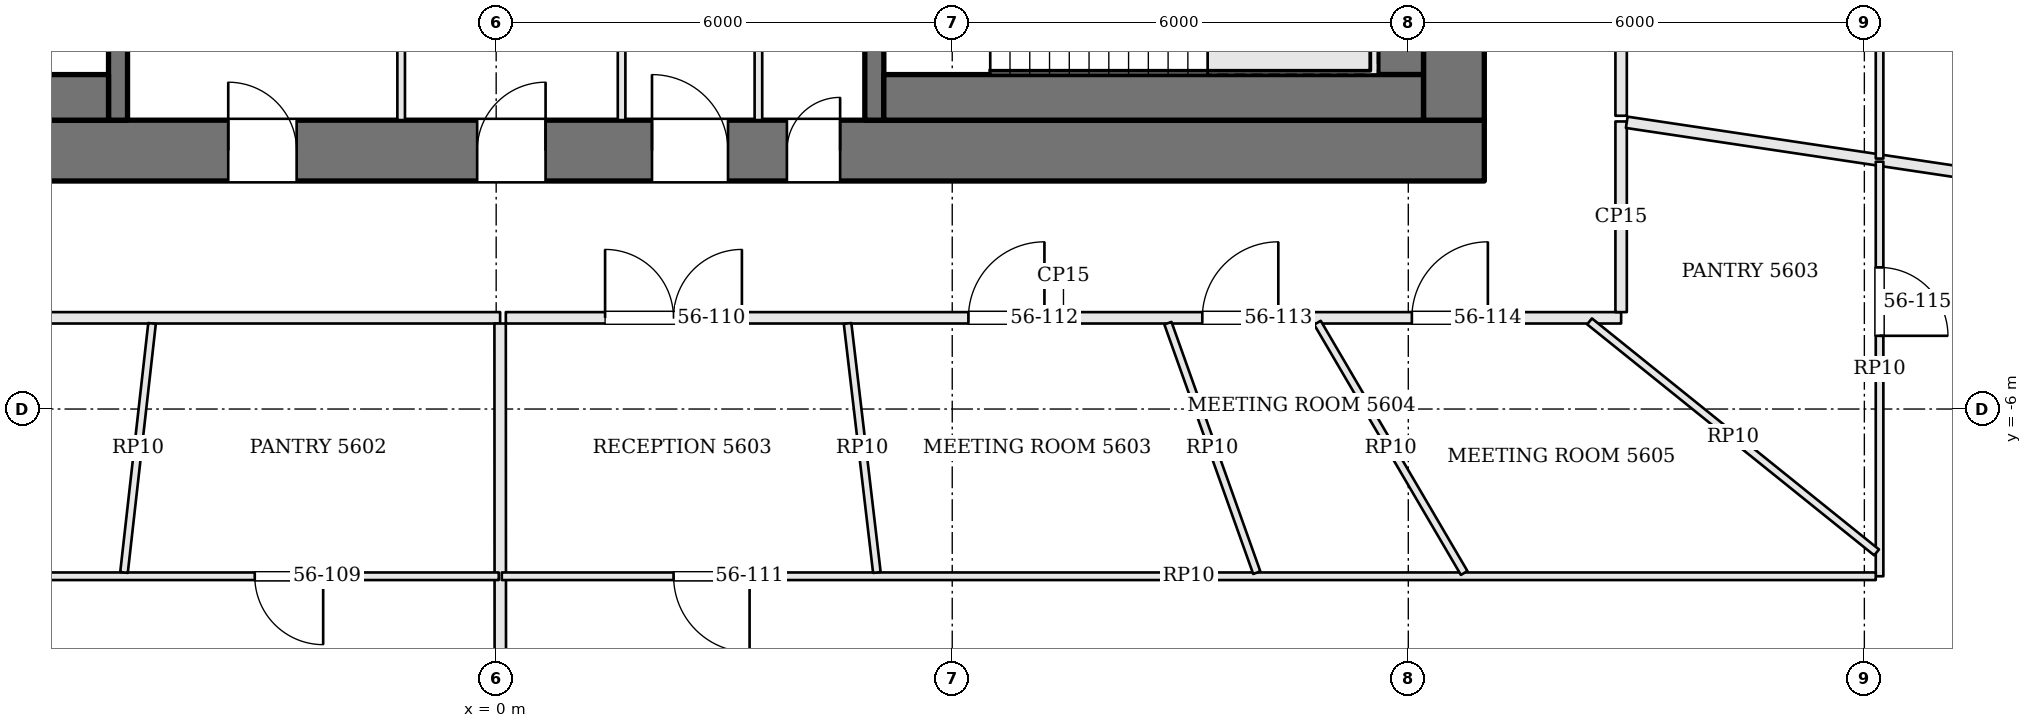
"""IFC4 building model, lengths in metres.
Left out: names, types, materials, properties, quantities, classifications, styles, units other than length and angle.
Written with IfcOpenShell. Run it as: python <this file> out.ifc"""

import sys

from ifc_helpers import new_model, si_unit, direction, frame, frame_2d, origin, place, context, subcontext, project, spatial, rectangle, extrude, element, fill, save


model = new_model("IFC4")
c1 = context("Model", 3, precision=1e-05, world=origin(), true_north=direction((0.0, 1.0)))
c2 = subcontext(c1, "Body", "Model", "MODEL_VIEW")
j1 = project(units=[si_unit("LENGTHUNIT", "METRE"), si_unit("PLANEANGLEUNIT", "RADIAN")], contexts=[c1])
p1 = place(None, origin())
s1 = spatial("IfcSite", under=j1, at=p1, CompositionType="ELEMENT")
p2 = place(p1, origin())
s2 = spatial("IfcBuilding", under=s1, at=p2, CompositionType="ELEMENT")
p3 = place(p2, frame((0.0, 0.0, 229.2)))
s3 = spatial("IfcBuildingStorey", under=s2, at=p3, CompositionType="ELEMENT", Elevation=229.2)
p4 = place(p3, frame((-13.0, -2.6, 0.0), z_axis=(0.0, 0.0, 1.0), x_axis=(1.0, 0.0, 0.0)))
e1 = element("IfcWall", 1, at=p4, inside=s3, PredefinedType="SHEAR", context=c2, shape_type="SweptSolid", body=[
    extrude(rectangle(XDim=26.0, YDim=0.8, at=frame_2d((13.0, 0.0))), origin(), (0.0, 0.0, 1.0), 3.9),
])
p5 = place(p4, frame((9.475, 0.0, 0.0)))
e2 = element("IfcOpeningElement", 2, at=p5, cuts=e1, PredefinedType="OPENING", context=c2, shape_type="SweptSolid", body=[
    extrude(rectangle(XDim=0.9, YDim=2.1, at=frame_2d((0.45, 1.05))), frame((0.0, 0.41, 0.0), z_axis=(0.0, -1.0, 0.0), x_axis=(1.0, 0.0, 0.0)), (0.0, 0.0, 1.0), 0.82),
])
p6 = place(p4, frame((12.75, 0.0, 0.0)))
e3 = element("IfcOpeningElement", 3, at=p6, cuts=e1, PredefinedType="OPENING", context=c2, shape_type="SweptSolid", body=[
    extrude(rectangle(XDim=0.9, YDim=2.1, at=frame_2d((0.45, 1.05))), frame((0.0, 0.41, 0.0), z_axis=(0.0, -1.0, 0.0), x_axis=(1.0, 0.0, 0.0)), (0.0, 0.0, 1.0), 0.82),
])
p7 = place(p4, frame((15.05, 0.0, 0.0)))
e4 = element("IfcOpeningElement", 4, at=p7, cuts=e1, PredefinedType="OPENING", context=c2, shape_type="SweptSolid", body=[
    extrude(rectangle(XDim=1.0, YDim=2.1, at=frame_2d((0.5, 1.05))), frame((0.0, 0.41, 0.0), z_axis=(0.0, -1.0, 0.0), x_axis=(1.0, 0.0, 0.0)), (0.0, 0.0, 1.0), 0.82),
])
p8 = place(p4, frame((16.825, 0.0, 0.0)))
e5 = element("IfcOpeningElement", 5, at=p8, cuts=e1, PredefinedType="OPENING", context=c2, shape_type="SweptSolid", body=[
    extrude(rectangle(XDim=0.7, YDim=2.1, at=frame_2d((0.35, 1.05))), frame((0.0, 0.41, 0.0), z_axis=(0.0, -1.0, 0.0), x_axis=(1.0, 0.0, 0.0)), (0.0, 0.0, 1.0), 0.82),
])
p9 = place(p3, frame((12.6, -2.2, 0.0), z_axis=(0.0, 0.0, 1.0), x_axis=(0.0, 1.0, 0.0)))
e6 = element("IfcWall", 6, at=p9, inside=s3, PredefinedType="SHEAR", context=c2, shape_type="SweptSolid", body=[
    extrude(rectangle(XDim=13.4, YDim=0.8, at=frame_2d((6.7, 0.0))), origin(), (0.0, 0.0, 1.0), 3.9),
])
p10 = place(p9, frame((7.4, 0.0, 0.0)))
e7 = element("IfcOpeningElement", 7, at=p10, cuts=e6, PredefinedType="OPENING", context=c2, shape_type="SweptSolid", body=[
    extrude(rectangle(XDim=1.8, YDim=2.1, at=frame_2d((0.9, 1.05))), frame((0.0, 0.41, 0.0), z_axis=(0.0, -1.0, 0.0), x_axis=(1.0, 0.0, 0.0)), (0.0, 0.0, 1.0), 0.82),
])
p11 = place(p3, frame((-4.975, -2.2, 0.0), z_axis=(0.0, 0.0, 1.0), x_axis=(0.0, 1.0, 0.0)))
e8 = element("IfcWall", 8, at=p11, inside=s3, PredefinedType="SOLIDWALL", context=c2, shape_type="SweptSolid", body=[
    extrude(rectangle(XDim=13.4, YDim=0.25, at=frame_2d((6.7, 0.0))), origin(), (0.0, 0.0, 1.0), 3.7),
])
p12 = place(p11, frame((5.25, 0.0, 0.0)))
e9 = element("IfcOpeningElement", 9, at=p12, cuts=e8, PredefinedType="OPENING", context=c2, shape_type="SweptSolid", body=[
    extrude(rectangle(XDim=1.2, YDim=2.1, at=frame_2d((0.6, 1.05))), frame((0.0, 0.135, 0.0), z_axis=(0.0, -1.0, 0.0), x_axis=(1.0, 0.0, 0.0)), (0.0, 0.0, 1.0), 0.27),
])
p13 = place(p3, frame((4.975, 11.2, 0.0), z_axis=(0.0, 0.0, 1.0), x_axis=(0.0, -1.0, 0.0)))
e10 = element("IfcWall", 10, at=p13, inside=s3, PredefinedType="SOLIDWALL", context=c2, shape_type="SweptSolid", body=[
    extrude(rectangle(XDim=13.4, YDim=0.25, at=frame_2d((6.7, 0.0))), origin(), (0.0, 0.0, 1.0), 3.7),
])
p14 = place(p13, frame((5.25, 0.0, 0.0)))
e11 = element("IfcOpeningElement", 11, at=p14, cuts=e10, PredefinedType="OPENING", context=c2, shape_type="SweptSolid", body=[
    extrude(rectangle(XDim=1.2, YDim=2.1, at=frame_2d((0.6, 1.05))), frame((0.0, 0.135, 0.0), z_axis=(0.0, -1.0, 0.0), x_axis=(1.0, 0.0, 0.0)), (0.0, 0.0, 1.0), 0.27),
])
p15 = place(p3, frame((-12.2, -1.9, 0.0), z_axis=(0.0, 0.0, 1.0), x_axis=(1.0, 0.0, 0.0)))
e12 = element("IfcWall", 12, at=p15, inside=s3, PredefinedType="SOLIDWALL", context=c2, shape_type="SweptSolid", body=[
    extrude(rectangle(XDim=7.1, YDim=0.6, at=frame_2d((3.55, 0.0))), origin(), (0.0, 0.0, 1.0), 3.7),
])
p16 = place(p3, frame((11.9, 1.35, 0.0), z_axis=(0.0, 0.0, 1.0), x_axis=(0.0, -1.0, 0.0)))
e13 = element("IfcWall", 13, at=p16, inside=s3, PredefinedType="SOLIDWALL", context=c2, shape_type="SweptSolid", body=[
    extrude(rectangle(XDim=2.95, YDim=0.6, at=frame_2d((1.475, 0.0))), origin(), (0.0, 0.0, 1.0), 3.7),
])
p17 = place(p3, frame((12.2, -1.9, 0.0), z_axis=(0.0, 0.0, 1.0), x_axis=(-1.0, 0.0, 0.0)))
e14 = element("IfcWall", 14, at=p17, inside=s3, PredefinedType="SOLIDWALL", context=c2, shape_type="SweptSolid", body=[
    extrude(rectangle(XDim=7.1, YDim=0.6, at=frame_2d((3.55, 0.0))), origin(), (0.0, 0.0, 1.0), 3.7),
])
for number, where, z_axis, x_axis in (
    (15, (-1.25, -2.2, 0.0), (0.0, 0.0, 1.0), (0.0, 1.0, 0.0)),
    (16, (1.65, -2.2, 0.0), (0.0, 0.0, 1.0), (0.0, 1.0, 0.0)),
    (17, (3.45, -2.2, 0.0), (0.0, 0.0, 1.0), (0.0, 1.0, 0.0)),
):
    element("IfcWall", number, at=place(p3, frame(where, z_axis=z_axis, x_axis=x_axis)), inside=s3, PredefinedType="PARTITIONING", context=c2, shape_type="SweptSolid", body=[
        extrude(rectangle(XDim=2.6, YDim=0.1, at=frame_2d((1.3, 0.0))), origin(), (0.0, 0.0, 1.0), 3.7),
    ])
p18 = place(p3, frame((-14.725, -4.8, 0.0), z_axis=(0.0, 0.0, 1.0), x_axis=(1.0, 0.0, 0.0)))
e18 = element("IfcWall", 18, at=p18, inside=s3, PredefinedType="PARTITIONING", context=c2, shape_type="SweptSolid", body=[
    extrude(rectangle(XDim=14.777, YDim=0.15, at=frame_2d((7.389, 0.0))), origin(), (0.0, 0.0, 1.0), 3.084),
])
p19 = place(p18, frame((0.45, 0.0, 0.0)))
e19 = element("IfcOpeningElement", 19, at=p19, cuts=e18, PredefinedType="OPENING", context=c2, shape_type="SweptSolid", body=[
    extrude(rectangle(XDim=1.8, YDim=2.1, at=frame_2d((0.9, 1.05))), frame((0.0, 0.085, 0.0), z_axis=(0.0, -1.0, 0.0), x_axis=(1.0, 0.0, 0.0)), (0.0, 0.0, 1.0), 0.17),
])
p20 = place(p18, frame((6.579, 0.0, 0.0)))
e20 = element("IfcOpeningElement", 20, at=p20, cuts=e18, PredefinedType="OPENING", context=c2, shape_type="SweptSolid", body=[
    extrude(rectangle(XDim=1.0, YDim=2.4, at=frame_2d((0.5, 1.2))), frame((0.0, 0.085, 0.0), z_axis=(0.0, -1.0, 0.0), x_axis=(1.0, 0.0, 0.0)), (0.0, 0.0, 1.0), 0.17),
])
p21 = place(p3, frame((0.062, -22.837, 0.0), z_axis=(0.0, 0.0, 1.0), x_axis=(-0.000584445492, 0.999999829212, 0.0)))
e21 = element("IfcWall", 21, at=p21, inside=s3, PredefinedType="PARTITIONING", context=c2, shape_type="SweptSolid", body=[
    extrude(rectangle(XDim=17.962, YDim=0.15, at=frame_2d((8.981, 0.0))), origin(), (0.0, 0.0, 1.0), 3.234),
])
p22 = place(p3, frame((0.127, -4.8, 0.0), z_axis=(0.0, 0.0, 1.0), x_axis=(1.0, 0.0, 0.0)))
e22 = element("IfcWall", 22, at=p22, inside=s3, PredefinedType="PARTITIONING", context=c2, shape_type="SweptSolid", body=[
    extrude(rectangle(XDim=14.673, YDim=0.15, at=frame_2d((7.336, 0.0))), origin(), (0.0, 0.0, 1.0), 3.084),
])
p23 = place(p22, frame((1.306, 0.0, 0.0)))
e23 = element("IfcOpeningElement", 23, at=p23, cuts=e22, PredefinedType="OPENING", context=c2, shape_type="SweptSolid", body=[
    extrude(rectangle(XDim=1.8, YDim=2.1, at=frame_2d((0.9, 1.05))), frame((0.0, 0.085, 0.0), z_axis=(0.0, -1.0, 0.0), x_axis=(1.0, 0.0, 0.0)), (0.0, 0.0, 1.0), 0.17),
])
p24 = place(p22, frame((6.086, 0.0, 0.0)))
e24 = element("IfcOpeningElement", 24, at=p24, cuts=e22, PredefinedType="OPENING", context=c2, shape_type="SweptSolid", body=[
    extrude(rectangle(XDim=1.0, YDim=2.4, at=frame_2d((0.5, 1.2))), frame((0.0, 0.085, 0.0), z_axis=(0.0, -1.0, 0.0), x_axis=(1.0, 0.0, 0.0)), (0.0, 0.0, 1.0), 0.17),
])
p25 = place(p22, frame((9.163, 0.0, 0.0)))
e25 = element("IfcOpeningElement", 25, at=p25, cuts=e22, PredefinedType="OPENING", context=c2, shape_type="SweptSolid", body=[
    extrude(rectangle(XDim=1.0, YDim=2.4, at=frame_2d((0.5, 1.2))), frame((0.0, 0.085, 0.0), z_axis=(0.0, -1.0, 0.0), x_axis=(1.0, 0.0, 0.0)), (0.0, 0.0, 1.0), 0.17),
])
p26 = place(p22, frame((11.92, 0.0, 0.0)))
e26 = element("IfcOpeningElement", 26, at=p26, cuts=e22, PredefinedType="OPENING", context=c2, shape_type="SweptSolid", body=[
    extrude(rectangle(XDim=1.0, YDim=2.4, at=frame_2d((0.5, 1.2))), frame((0.0, 0.085, 0.0), z_axis=(0.0, -1.0, 0.0), x_axis=(1.0, 0.0, 0.0)), (0.0, 0.0, 1.0), 0.17),
])
p27 = place(p3, frame((14.8, -4.725, 0.0), z_axis=(0.0, 0.0, 1.0), x_axis=(0.0, 1.0, 0.0)))
e27 = element("IfcWall", 27, at=p27, inside=s3, PredefinedType="PARTITIONING", context=c2, shape_type="SweptSolid", body=[
    extrude(rectangle(XDim=2.508, YDim=0.15, at=frame_2d((1.254, 0.0))), origin(), (0.0, 0.0, 1.0), 3.084),
])
p28 = place(p3, frame((26.957, -4.036, 0.0), z_axis=(0.0, 0.0, 1.0), x_axis=(-0.988991396253, 0.147973031788, 0.0)))
e28 = element("IfcWall", 28, at=p28, inside=s3, PredefinedType="PARTITIONING", context=c2, shape_type="SweptSolid", body=[
    extrude(rectangle(XDim=12.218, YDim=0.15, at=frame_2d((6.109, 0.0))), origin(), (0.0, 0.0, 1.0), 3.234),
])
p29 = place(p3, frame((14.8, -2.142, 0.0), z_axis=(0.0, 0.0, 1.0), x_axis=(0.0, 1.0, 0.0)))
e29 = element("IfcWall", 29, at=p29, inside=s3, PredefinedType="PARTITIONING", context=c2, shape_type="SweptSolid", body=[
    extrude(rectangle(XDim=15.942, YDim=0.15, at=frame_2d((7.971, 0.0))), origin(), (0.0, 0.0, 1.0), 3.084),
])
p30 = place(p29, frame((3.967, 0.0, 0.0)))
e30 = element("IfcOpeningElement", 30, at=p30, cuts=e29, PredefinedType="OPENING", context=c2, shape_type="SweptSolid", body=[
    extrude(rectangle(XDim=1.8, YDim=2.1, at=frame_2d((0.9, 1.05))), frame((0.0, 0.085, 0.0), z_axis=(0.0, -1.0, 0.0), x_axis=(1.0, 0.0, 0.0)), (0.0, 0.0, 1.0), 0.17),
])
p31 = place(p29, frame((13.598, 0.0, 0.0)))
e31 = element("IfcOpeningElement", 31, at=p31, cuts=e29, PredefinedType="OPENING", context=c2, shape_type="SweptSolid", body=[
    extrude(rectangle(XDim=1.0, YDim=2.4, at=frame_2d((0.5, 1.2))), frame((0.0, 0.085, 0.0), z_axis=(0.0, -1.0, 0.0), x_axis=(1.0, 0.0, 0.0)), (0.0, 0.0, 1.0), 0.17),
])
p32 = place(p3, frame((0.034, -8.2, 0.0), z_axis=(0.0, 0.0, 1.0), x_axis=(-1.0, 0.0, 0.0)))
e32 = element("IfcWall", 32, at=p32, inside=s3, PredefinedType="PARTITIONING", context=c2, shape_type="SweptSolid", body=[
    extrude(rectangle(XDim=18.234, YDim=0.1, at=frame_2d((9.117, 0.0))), origin(), (0.0, 0.0, 1.0), 3.084),
])
p33 = place(p32, frame((2.31, 0.0, 0.0)))
e33 = element("IfcOpeningElement", 33, at=p33, cuts=e32, PredefinedType="OPENING", context=c2, shape_type="SweptSolid", body=[
    extrude(rectangle(XDim=0.9, YDim=2.1, at=frame_2d((0.45, 1.05))), frame((0.0, 0.06, 0.0), z_axis=(0.0, -1.0, 0.0), x_axis=(1.0, 0.0, 0.0)), (0.0, 0.0, 1.0), 0.12),
])
p34 = place(p3, frame((-4.527, -4.875, 0.0), z_axis=(0.0, 0.0, 1.0), x_axis=(-0.111902643695, -0.993719174784, 0.0)))
e34 = element("IfcWall", 34, at=p34, inside=s3, PredefinedType="PARTITIONING", context=c2, shape_type="SweptSolid", body=[
    extrude(rectangle(XDim=3.297, YDim=0.1, at=frame_2d((1.648, 0.0))), origin(), (0.0, 0.0, 1.0), 3.084),
])
p35 = place(p3, frame((18.2, -2.746, 0.0), z_axis=(0.0, 0.0, 1.0), x_axis=(0.0, -1.0, 0.0)))
e35 = element("IfcWall", 35, at=p35, inside=s3, PredefinedType="PARTITIONING", context=c2, shape_type="SweptSolid", body=[
    extrude(rectangle(XDim=5.454, YDim=0.1, at=frame_2d((2.727, 0.0))), origin(), (0.0, 0.0, 1.0), 3.084),
])
p36 = place(p35, frame((1.391, 0.0, 0.0)))
e36 = element("IfcOpeningElement", 36, at=p36, cuts=e35, PredefinedType="OPENING", context=c2, shape_type="SweptSolid", body=[
    extrude(rectangle(XDim=0.9, YDim=2.1, at=frame_2d((0.45, 1.05))), frame((0.0, 0.06, 0.0), z_axis=(0.0, -1.0, 0.0), x_axis=(1.0, 0.0, 0.0)), (0.0, 0.0, 1.0), 0.12),
])
p37 = place(p3, frame((18.15, -8.2, 0.0), z_axis=(0.0, 0.0, 1.0), x_axis=(-1.0, 0.0, 0.0)))
e37 = element("IfcWall", 37, at=p37, inside=s3, PredefinedType="PARTITIONING", context=c2, shape_type="SweptSolid", body=[
    extrude(rectangle(XDim=18.076, YDim=0.1, at=frame_2d((9.038, 0.0))), origin(), (0.0, 0.0, 1.0), 3.084),
])
p38 = place(p37, frame((14.816, 0.0, 0.0)))
e38 = element("IfcOpeningElement", 38, at=p38, cuts=e37, PredefinedType="OPENING", context=c2, shape_type="SweptSolid", body=[
    extrude(rectangle(XDim=1.0, YDim=2.1, at=frame_2d((0.5, 1.05))), frame((0.0, 0.06, 0.0), z_axis=(0.0, -1.0, 0.0), x_axis=(1.0, 0.0, 0.0)), (0.0, 0.0, 1.0), 0.12),
])
p39 = place(p3, frame((4.623, -4.875, 0.0), z_axis=(0.0, 0.0, 1.0), x_axis=(0.116871308631, -0.993147067266, 0.0)))
e39 = element("IfcWall", 39, at=p39, inside=s3, PredefinedType="PARTITIONING", context=c2, shape_type="SweptSolid", body=[
    extrude(rectangle(XDim=3.299, YDim=0.1, at=frame_2d((1.649, 0.0))), origin(), (0.0, 0.0, 1.0), 3.084),
])
p40 = place(p3, frame((8.838, -4.871, 0.0), z_axis=(0.0, 0.0, 1.0), x_axis=(0.335439563495, -0.942061727936, 0.0)))
e40 = element("IfcWall", 40, at=p40, inside=s3, PredefinedType="PARTITIONING", context=c2, shape_type="SweptSolid", body=[
    extrude(rectangle(XDim=3.484, YDim=0.1, at=frame_2d((1.742, 0.0))), origin(), (0.0, 0.0, 1.0), 3.084),
])
p41 = place(p3, frame((10.805, -4.865, 0.0), z_axis=(0.0, 0.0, 1.0), x_axis=(0.505719499712, -0.862697970098, 0.0)))
e41 = element("IfcWall", 41, at=p41, inside=s3, PredefinedType="PARTITIONING", context=c2, shape_type="SweptSolid", body=[
    extrude(rectangle(XDim=3.816, YDim=0.1, at=frame_2d((1.908, 0.0))), origin(), (0.0, 0.0, 1.0), 3.084),
])
p42 = place(p3, frame((14.385, -4.847, 0.0), z_axis=(0.0, 0.0, 1.0), x_axis=(0.779012885321, -0.627007914228, 0.0)))
e42 = element("IfcWall", 42, at=p42, inside=s3, PredefinedType="PARTITIONING", context=c2, shape_type="SweptSolid", body=[
    extrude(rectangle(XDim=4.847, YDim=0.1, at=frame_2d((2.424, 0.0))), origin(), (0.0, 0.0, 1.0), 3.084),
])
p43 = place(p3, frame((18.2, 14.562, 0.0), z_axis=(0.0, 0.0, 1.0), x_axis=(0.0, -1.0, 0.0)))
e43 = element("IfcWall", 43, at=p43, inside=s3, PredefinedType="PARTITIONING", context=c2, shape_type="SweptSolid", body=[
    extrude(rectangle(XDim=17.267, YDim=0.1, at=frame_2d((8.634, 0.0))), origin(), (0.0, 0.0, 1.0), 3.084),
])
p44 = place(p43, frame((11.024, 0.0, 0.0)))
e44 = element("IfcOpeningElement", 44, at=p44, cuts=e43, PredefinedType="OPENING", context=c2, shape_type="SweptSolid", body=[
    extrude(rectangle(XDim=1.0, YDim=2.1, at=frame_2d((0.5, 1.05))), frame((0.0, 0.06, 0.0), z_axis=(0.0, -1.0, 0.0), x_axis=(1.0, 0.0, 0.0)), (0.0, 0.0, 1.0), 0.12),
])
p45 = place(p5, origin())
e45 = element("IfcDoor", 45, at=p45, inside=s3, OperationType="SINGLE_SWING_LEFT", PredefinedType="DOOR", context=c2, shape_type="SweptSolid", body=[
    extrude(rectangle(XDim=0.9, YDim=2.1, at=frame_2d((0.45, 1.05))), frame((0.0, 0.025, 0.0), z_axis=(0.0, -1.0, 0.0), x_axis=(1.0, 0.0, 0.0)), (0.0, 0.0, 1.0), 0.05),
])
fill(e2, e45)
p46 = place(p6, origin())
e46 = element("IfcDoor", 46, at=p46, inside=s3, OperationType="SINGLE_SWING_RIGHT", PredefinedType="DOOR", context=c2, shape_type="SweptSolid", body=[
    extrude(rectangle(XDim=0.9, YDim=2.1, at=frame_2d((0.45, 1.05))), frame((0.0, 0.025, 0.0), z_axis=(0.0, -1.0, 0.0), x_axis=(1.0, 0.0, 0.0)), (0.0, 0.0, 1.0), 0.05),
])
fill(e3, e46)
p47 = place(p7, origin())
e47 = element("IfcDoor", 47, at=p47, inside=s3, OperationType="SINGLE_SWING_LEFT", PredefinedType="DOOR", context=c2, shape_type="SweptSolid", body=[
    extrude(rectangle(XDim=1.0, YDim=2.1, at=frame_2d((0.5, 1.05))), frame((0.0, 0.025, 0.0), z_axis=(0.0, -1.0, 0.0), x_axis=(1.0, 0.0, 0.0)), (0.0, 0.0, 1.0), 0.05),
])
fill(e4, e47)
p48 = place(p8, origin())
e48 = element("IfcDoor", 48, at=p48, inside=s3, OperationType="SINGLE_SWING_RIGHT", PredefinedType="DOOR", context=c2, shape_type="SweptSolid", body=[
    extrude(rectangle(XDim=0.7, YDim=2.1, at=frame_2d((0.35, 1.05))), frame((0.0, 0.025, 0.0), z_axis=(0.0, -1.0, 0.0), x_axis=(1.0, 0.0, 0.0)), (0.0, 0.0, 1.0), 0.05),
])
fill(e5, e48)
p49 = place(p33, origin())
e49 = element("IfcDoor", 49, at=p49, inside=s3, OperationType="SINGLE_SWING_LEFT", PredefinedType="DOOR", context=c2, shape_type="SweptSolid", body=[
    extrude(rectangle(XDim=0.9, YDim=2.1, at=frame_2d((0.45, 1.05))), frame((0.0, 0.025, 0.0), z_axis=(0.0, -1.0, 0.0), x_axis=(1.0, 0.0, 0.0)), (0.0, 0.0, 1.0), 0.05),
])
fill(e33, e49)
p50 = place(p23, origin())
e50 = element("IfcDoor", 50, at=p50, inside=s3, OperationType="DOUBLE_DOOR_SINGLE_SWING", PredefinedType="DOOR", context=c2, shape_type="SweptSolid", body=[
    extrude(rectangle(XDim=1.8, YDim=2.1, at=frame_2d((0.9, 1.05))), frame((0.0, 0.025, 0.0), z_axis=(0.0, -1.0, 0.0), x_axis=(1.0, 0.0, 0.0)), (0.0, 0.0, 1.0), 0.05),
])
fill(e23, e50)
p51 = place(p38, origin())
e51 = element("IfcDoor", 51, at=p51, inside=s3, OperationType="SINGLE_SWING_LEFT", PredefinedType="DOOR", context=c2, shape_type="SweptSolid", body=[
    extrude(rectangle(XDim=1.0, YDim=2.1, at=frame_2d((0.5, 1.05))), frame((0.0, 0.025, 0.0), z_axis=(0.0, -1.0, 0.0), x_axis=(1.0, 0.0, 0.0)), (0.0, 0.0, 1.0), 0.05),
])
fill(e38, e51)
p52 = place(p24, origin())
e52 = element("IfcDoor", 52, at=p52, inside=s3, OperationType="SINGLE_SWING_RIGHT", PredefinedType="DOOR", context=c2, shape_type="SweptSolid", body=[
    extrude(rectangle(XDim=1.0, YDim=2.4, at=frame_2d((0.5, 1.2))), frame((0.0, 0.025, 0.0), z_axis=(0.0, -1.0, 0.0), x_axis=(1.0, 0.0, 0.0)), (0.0, 0.0, 1.0), 0.05),
])
fill(e24, e52)
p53 = place(p25, origin())
e53 = element("IfcDoor", 53, at=p53, inside=s3, OperationType="SINGLE_SWING_RIGHT", PredefinedType="DOOR", context=c2, shape_type="SweptSolid", body=[
    extrude(rectangle(XDim=1.0, YDim=2.4, at=frame_2d((0.5, 1.2))), frame((0.0, 0.025, 0.0), z_axis=(0.0, -1.0, 0.0), x_axis=(1.0, 0.0, 0.0)), (0.0, 0.0, 1.0), 0.05),
])
fill(e25, e53)
p54 = place(p26, origin())
e54 = element("IfcDoor", 54, at=p54, inside=s3, OperationType="SINGLE_SWING_RIGHT", PredefinedType="DOOR", context=c2, shape_type="SweptSolid", body=[
    extrude(rectangle(XDim=1.0, YDim=2.4, at=frame_2d((0.5, 1.2))), frame((0.0, 0.025, 0.0), z_axis=(0.0, -1.0, 0.0), x_axis=(1.0, 0.0, 0.0)), (0.0, 0.0, 1.0), 0.05),
])
fill(e26, e54)
p55 = place(p36, origin())
e55 = element("IfcDoor", 55, at=p55, inside=s3, OperationType="SINGLE_SWING_RIGHT", PredefinedType="DOOR", context=c2, shape_type="SweptSolid", body=[
    extrude(rectangle(XDim=0.9, YDim=2.1, at=frame_2d((0.45, 1.05))), frame((0.0, 0.025, 0.0), z_axis=(0.0, -1.0, 0.0), x_axis=(1.0, 0.0, 0.0)), (0.0, 0.0, 1.0), 0.05),
])
fill(e36, e55)
save(model, sys.argv[1])
